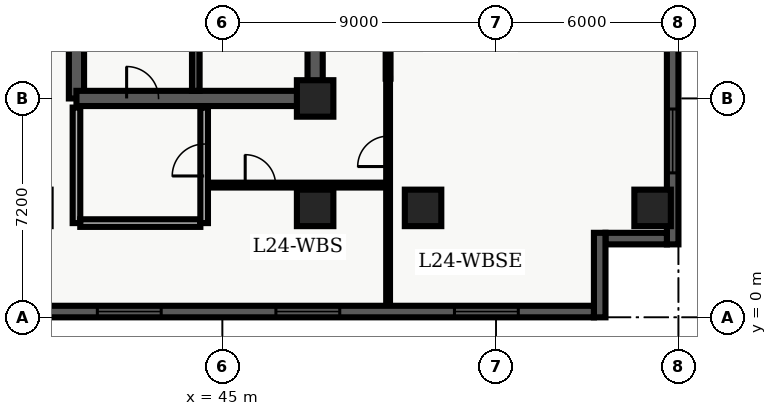
"""IFC4 building model, lengths in metres.
Left out: names, types, materials, properties, quantities, classifications, styles, units other than length and angle.
Written with IfcOpenShell. Run it as: python <this file> out.ifc"""

import sys

from ifc_helpers import new_model, entity, si_unit, converted_unit, direction, frame, origin_with_axes, origin_2d_with_axis, place, context, subcontext, project, spatial, polyline, rectangle, outline, extrude, element, fill, save


model = new_model("IFC4")
c1 = context("Model", 3, precision=1e-05, world=origin_with_axes(), true_north=direction((0.0, 1.0)))
c2 = subcontext(c1, "Body", "Model", "MODEL_VIEW")
j1 = project(units=[si_unit("LENGTHUNIT", "METRE"), converted_unit("PLANEANGLEUNIT", "DEGREE", entity("IfcPlaneAngleMeasure", 0.017), si_unit("PLANEANGLEUNIT", "RADIAN"), dimensions=[0, 0, 0, 0, 0, 0, 0])], contexts=[c1])
p1 = place(None, origin_with_axes())
s1 = spatial("IfcSite", under=j1, at=p1, CompositionType="ELEMENT")
p2 = place(p1, origin_with_axes())
s2 = spatial("IfcBuilding", under=s1, at=p2, CompositionType="ELEMENT")
p3 = place(p2, frame((0.0, 0.0, 100.8), z_axis=(0.0, 0.0, 1.0), x_axis=(1.0, 0.0, 0.0)))
s3 = spatial("IfcBuildingStorey", under=s2, at=p3, CompositionType="ELEMENT", Elevation=100.8)
p4 = place(p3, frame((40.2, 7.2, 0.0), z_axis=(0.0, 0.0, 1.0), x_axis=(0.0, 1.0, 0.0)))
e1 = element("IfcWall", 1, at=p4, inside=s3, PredefinedType="SHEAR", context=c2, shape_type="SweptSolid", body=[
    extrude(outline(polyline([(0.0, -0.25), (15.6, -0.25), (15.6, 0.25), (0.0, 0.25), (0.0, -0.25)])), origin_with_axes(), (0.0, 0.0, 1.0), 3.66),
])
p5 = place(p4, frame((12.75, 0.0, 0.0), z_axis=(0.0, 0.0, 1.0), x_axis=(1.0, 0.0, 0.0)))
e2 = element("IfcOpeningElement", 2, at=p5, cuts=e1, PredefinedType="OPENING", context=c2, shape_type="SweptSolid", body=[
    extrude(rectangle(XDim=1.2, YDim=0.52, at=origin_2d_with_axis()), origin_with_axes(), (0.0, 0.0, 1.0), 2.15),
])
p6 = place(p3, frame((40.2, 7.2, 0.0), z_axis=(0.0, 0.0, 1.0), x_axis=(1.0, 0.0, 0.0)))
e3 = element("IfcWall", 3, at=p6, inside=s3, PredefinedType="SHEAR", context=c2, shape_type="SweptSolid", body=[
    extrude(outline(polyline([(0.0, -0.25), (7.85, -0.25), (7.85, 0.25), (0.0, 0.25), (0.0, -0.25)])), origin_with_axes(), (0.0, 0.0, 1.0), 3.66),
])
p7 = place(p6, frame((2.175, 0.0, 0.0), z_axis=(0.0, 0.0, 1.0), x_axis=(1.0, 0.0, 0.0)))
e4 = element("IfcOpeningElement", 4, at=p7, cuts=e3, PredefinedType="OPENING", context=c2, shape_type="SweptSolid", body=[
    extrude(rectangle(XDim=1.05, YDim=0.52, at=origin_2d_with_axis()), origin_with_axes(), (0.0, 0.0, 1.0), 2.15),
])
p8 = place(p3, frame((48.05, 7.2, 0.0), z_axis=(0.0, 0.0, 1.0), x_axis=(0.0, 1.0, 0.0)))
e5 = element("IfcWall", 5, at=p8, inside=s3, PredefinedType="SHEAR", context=c2, shape_type="SweptSolid", body=[
    extrude(outline(polyline([(0.0, -0.25), (15.6, -0.25), (15.6, 0.25), (0.0, 0.25), (0.0, -0.25)])), origin_with_axes(), (0.0, 0.0, 1.0), 3.66),
])
p9 = place(p8, frame((4.125, 0.0, 0.0), z_axis=(0.0, 0.0, 1.0), x_axis=(1.0, 0.0, 0.0)))
e6 = element("IfcOpeningElement", 6, at=p9, cuts=e5, PredefinedType="OPENING", context=c2, shape_type="SweptSolid", body=[
    extrude(rectangle(XDim=1.05, YDim=0.52, at=origin_2d_with_axis()), origin_with_axes(), (0.0, 0.0, 1.0), 2.15),
])
p10 = place(p3, frame((44.125, 7.45, 0.0), z_axis=(0.0, 0.0, 1.0), x_axis=(0.0, 1.0, 0.0)))
e7 = element("IfcWall", 7, at=p10, inside=s3, PredefinedType="SHEAR", context=c2, shape_type="SweptSolid", body=[
    extrude(outline(polyline([(0.0, -0.125), (15.1, -0.125), (15.1, 0.125), (0.0, 0.125), (0.0, -0.125)])), origin_with_axes(), (0.0, 0.0, 1.0), 3.66),
])
p11 = place(p3, frame((40.2, 3.1, 0.0), z_axis=(0.0, 0.0, 1.0), x_axis=(0.0, 1.0, 0.0)))
e8 = element("IfcWall", 8, at=p11, inside=s3, PredefinedType="SOLIDWALL", context=c2, shape_type="SweptSolid", body=[
    extrude(outline(polyline([(0.0, -0.125), (3.8, -0.125), (3.8, 0.125), (0.0, 0.125), (0.0, -0.125)])), origin_with_axes(), (0.0, 0.0, 1.0), 2.7),
])
p12 = place(p3, frame((40.325, 3.1, 0.0), z_axis=(0.0, 0.0, 1.0), x_axis=(1.0, 0.0, 0.0)))
e9 = element("IfcWall", 9, at=p12, inside=s3, PredefinedType="SOLIDWALL", context=c2, shape_type="SweptSolid", body=[
    extrude(outline(polyline([(0.0, -0.125), (3.95, -0.125), (3.95, 0.125), (0.0, 0.125), (0.0, -0.125)])), origin_with_axes(), (0.0, 0.0, 1.0), 2.7),
])
p13 = place(p3, frame((44.4, 3.1, 0.0), z_axis=(0.0, 0.0, 1.0), x_axis=(0.0, 1.0, 0.0)))
e10 = element("IfcWall", 10, at=p13, inside=s3, PredefinedType="SOLIDWALL", context=c2, shape_type="SweptSolid", body=[
    extrude(outline(polyline([(0.0, -0.125), (3.8, -0.125), (3.8, 0.125), (0.0, 0.125), (0.0, -0.125)])), origin_with_axes(), (0.0, 0.0, 1.0), 2.7),
])
p14 = place(p13, frame((2.075, 0.0, 0.0), z_axis=(0.0, 0.0, 1.0), x_axis=(1.0, 0.0, 0.0)))
e11 = element("IfcOpeningElement", 11, at=p14, cuts=e10, PredefinedType="OPENING", context=c2, shape_type="SweptSolid", body=[
    extrude(rectangle(XDim=1.05, YDim=0.27, at=origin_2d_with_axis()), origin_with_axes(), (0.0, 0.0, 1.0), 2.15),
])
for number, where, z_axis, x_axis in (
    (12, (48.05, 3.6, 0.0), (0.0, 0.0, 1.0), (1.0, 0.0, 0.0)),
    (13, (48.05, 7.2, 0.0), (0.0, 0.0, 1.0), (1.0, 0.0, 0.0)),
    (14, (51.6, 3.6, 0.0), (0.0, 0.0, 1.0), (1.0, 0.0, 0.0)),
    (15, (59.15, 3.6, 0.0), (0.0, 0.0, 1.0), (1.0, 0.0, 0.0)),
):
    element("IfcColumn", number, at=place(p3, frame(where, z_axis=z_axis, x_axis=x_axis)), inside=s3, PredefinedType="COLUMN", context=c2, shape_type="SweptSolid", body=[
        extrude(rectangle(XDim=1.2, YDim=1.2, at=origin_2d_with_axis()), origin_with_axes(), (0.0, 0.0, 1.0), 3.9),
    ])
p15 = place(p3, frame((50.45, 7.85, 0.0), z_axis=(0.0, 0.0, 1.0), x_axis=(0.0, 1.0, 0.0)))
e16 = element("IfcWall", 16, at=p15, inside=s3, PredefinedType="PARTITIONING", context=c2, shape_type="SweptSolid", body=[
    extrude(outline(polyline([(0.0, -0.08), (18.8, -0.08), (18.8, 0.08), (0.0, 0.08), (0.0, -0.08)])), origin_with_axes(), (0.0, 0.0, 1.0), 2.7),
])
p16 = place(p15, frame((6.888, 0.0, 0.0), z_axis=(0.0, 0.0, 1.0), x_axis=(1.0, 0.0, 0.0)))
e17 = element("IfcOpeningElement", 17, at=p16, cuts=e16, PredefinedType="OPENING", context=c2, shape_type="SweptSolid", body=[
    extrude(rectangle(XDim=1.0, YDim=0.18, at=origin_2d_with_axis()), origin_with_axes(), (0.0, 0.0, 1.0), 2.15),
])
p17 = place(p15, frame((12.353, 0.0, 0.0), z_axis=(0.0, 0.0, 1.0), x_axis=(1.0, 0.0, 0.0)))
e18 = element("IfcOpeningElement", 18, at=p17, cuts=e16, PredefinedType="OPENING", context=c2, shape_type="SweptSolid", body=[
    extrude(rectangle(XDim=1.0, YDim=0.18, at=origin_2d_with_axis()), origin_with_axes(), (0.0, 0.0, 1.0), 2.15),
])
p18 = place(p15, frame((17.895, 0.0, 0.0), z_axis=(0.0, 0.0, 1.0), x_axis=(1.0, 0.0, 0.0)))
e19 = element("IfcOpeningElement", 19, at=p18, cuts=e16, PredefinedType="OPENING", context=c2, shape_type="SweptSolid", body=[
    extrude(rectangle(XDim=1.0, YDim=0.18, at=origin_2d_with_axis()), origin_with_axes(), (0.0, 0.0, 1.0), 2.15),
])
p19 = place(p3, frame((44.55, 4.35, 0.0), z_axis=(0.0, 0.0, 1.0), x_axis=(1.0, 0.0, 0.0)))
e20 = element("IfcWall", 20, at=p19, inside=s3, PredefinedType="PARTITIONING", context=c2, shape_type="SweptSolid", body=[
    extrude(outline(polyline([(0.0, -0.08), (5.9, -0.08), (5.9, 0.08), (0.0, 0.08), (0.0, -0.08)])), origin_with_axes(), (0.0, 0.0, 1.0), 2.7),
])
p20 = place(p19, frame((1.7, 0.0, 0.0), z_axis=(0.0, 0.0, 1.0), x_axis=(1.0, 0.0, 0.0)))
e21 = element("IfcOpeningElement", 21, at=p20, cuts=e20, PredefinedType="OPENING", context=c2, shape_type="SweptSolid", body=[
    extrude(rectangle(XDim=1.0, YDim=0.18, at=origin_2d_with_axis()), origin_with_axes(), (0.0, 0.0, 1.0), 2.15),
])
p21 = place(p3, frame((50.45, 0.36, 0.0), z_axis=(0.0, 0.0, 1.0), x_axis=(0.0, 1.0, 0.0)))
e22 = element("IfcWall", 22, at=p21, inside=s3, PredefinedType="PARTITIONING", context=c2, shape_type="SweptSolid", body=[
    extrude(outline(polyline([(0.0, -0.062), (7.49, -0.062), (7.49, 0.062), (0.0, 0.062), (0.0, -0.062)])), origin_with_axes(), (0.0, 0.0, 1.0), 2.7),
])
p22 = place(p21, frame((5.1, 0.0, 0.0), z_axis=(0.0, 0.0, 1.0), x_axis=(1.0, 0.0, 0.0)))
e23 = element("IfcOpeningElement", 23, at=p22, cuts=e22, PredefinedType="OPENING", context=c2, shape_type="SweptSolid", body=[
    extrude(rectangle(XDim=1.0, YDim=0.145, at=origin_2d_with_axis()), origin_with_axes(), (0.0, 0.0, 1.0), 2.15),
])
p23 = place(p3, frame((59.81, 26.02, 0.0), z_axis=(0.0, 0.0, 1.0), x_axis=(0.0, -1.0, 0.0)))
e24 = element("IfcWall", 24, at=p23, inside=s3, PredefinedType="SOLIDWALL", context=c2, shape_type="SweptSolid", body=[
    extrude(outline(polyline([(0.0, -0.19), (23.62, -0.19), (23.62, 0.19), (0.0, 0.19), (0.0, -0.19)])), origin_with_axes(), (0.0, 0.0, 1.0), 3.66),
])
p24 = place(p23, frame((20.218, 0.0, 0.45), z_axis=(0.0, 0.0, 1.0), x_axis=(1.0, 0.0, 0.0)))
e25 = element("IfcOpeningElement", 25, at=p24, cuts=e24, PredefinedType="OPENING", context=c2, shape_type="SweptSolid", body=[
    extrude(rectangle(XDim=2.1, YDim=0.4, at=origin_2d_with_axis()), origin_with_axes(), (0.0, 0.0, 1.0), 2.2),
])
p25 = place(p3, frame((59.62, 2.59, 0.0), z_axis=(0.0, 0.0, 1.0), x_axis=(-1.0, 0.0, 0.0)))
e26 = element("IfcWall", 26, at=p25, inside=s3, PredefinedType="SOLIDWALL", context=c2, shape_type="SweptSolid", body=[
    extrude(outline(polyline([(0.0, -0.19), (2.02, -0.19), (2.02, 0.19), (0.0, 0.19), (0.0, -0.19)])), origin_with_axes(), (0.0, 0.0, 1.0), 3.66),
])
p26 = place(p3, frame((57.41, 2.78, 0.0), z_axis=(0.0, 0.0, 1.0), x_axis=(0.0, -1.0, 0.0)))
e27 = element("IfcWall", 27, at=p26, inside=s3, PredefinedType="SOLIDWALL", context=c2, shape_type="SweptSolid", body=[
    extrude(outline(polyline([(0.0, -0.19), (2.78, -0.19), (2.78, 0.19), (0.0, 0.19), (0.0, -0.19)])), origin_with_axes(), (0.0, 0.0, 1.0), 3.66),
])
p27 = place(p3, frame((57.22, 0.19, 0.0), z_axis=(0.0, 0.0, 1.0), x_axis=(-1.0, 0.0, 0.0)))
e28 = element("IfcWall", 28, at=p27, inside=s3, PredefinedType="SOLIDWALL", context=c2, shape_type="SweptSolid", body=[
    extrude(outline(polyline([(0.0, -0.19), (18.82, -0.19), (18.82, 0.19), (0.0, 0.19), (0.0, -0.19)])), origin_with_axes(), (0.0, 0.0, 1.0), 3.66),
])
p28 = place(p27, frame((3.537, 0.0, 0.45), z_axis=(0.0, 0.0, 1.0), x_axis=(1.0, 0.0, 0.0)))
e29 = element("IfcOpeningElement", 29, at=p28, cuts=e28, PredefinedType="OPENING", context=c2, shape_type="SweptSolid", body=[
    extrude(rectangle(XDim=2.1, YDim=0.4, at=origin_2d_with_axis()), origin_with_axes(), (0.0, 0.0, 1.0), 2.2),
])
p29 = place(p27, frame((9.41, 0.0, 0.45), z_axis=(0.0, 0.0, 1.0), x_axis=(1.0, 0.0, 0.0)))
e30 = element("IfcOpeningElement", 30, at=p29, cuts=e28, PredefinedType="OPENING", context=c2, shape_type="SweptSolid", body=[
    extrude(rectangle(XDim=2.1, YDim=0.4, at=origin_2d_with_axis()), origin_with_axes(), (0.0, 0.0, 1.0), 2.2),
])
p30 = place(p27, frame((15.283, 0.0, 0.45), z_axis=(0.0, 0.0, 1.0), x_axis=(1.0, 0.0, 0.0)))
e31 = element("IfcOpeningElement", 31, at=p30, cuts=e28, PredefinedType="OPENING", context=c2, shape_type="SweptSolid", body=[
    extrude(rectangle(XDim=2.1, YDim=0.4, at=origin_2d_with_axis()), origin_with_axes(), (0.0, 0.0, 1.0), 2.2),
])
p31 = place(p6, frame((2.175, 0.0, 0.0), z_axis=(0.0, 0.0, 1.0), x_axis=(1.0, 0.0, 0.0)))
e32 = element("IfcDoor", 32, at=p31, inside=s3, OperationType="SINGLE_SWING_LEFT", PredefinedType="DOOR", context=c2, shape_type="SweptSolid", body=[
    extrude(rectangle(XDim=1.05, YDim=0.09, at=origin_2d_with_axis()), origin_with_axes(), (0.0, 0.0, 1.0), 2.15),
])
fill(e4, e32)
p32 = place(p13, frame((2.075, 0.0, 0.0), z_axis=(0.0, 0.0, 1.0), x_axis=(1.0, 0.0, 0.0)))
e33 = element("IfcDoor", 33, at=p32, inside=s3, OperationType="SINGLE_SWING_LEFT", PredefinedType="DOOR", context=c2, shape_type="SweptSolid", body=[
    extrude(rectangle(XDim=1.05, YDim=0.09, at=origin_2d_with_axis()), origin_with_axes(), (0.0, 0.0, 1.0), 2.15),
])
fill(e11, e33)
p33 = place(p19, frame((1.7, 0.0, 0.0), z_axis=(0.0, 0.0, 1.0), x_axis=(1.0, 0.0, 0.0)))
e34 = element("IfcDoor", 34, at=p33, inside=s3, OperationType="SINGLE_SWING_LEFT", PredefinedType="DOOR", context=c2, shape_type="SweptSolid", body=[
    extrude(rectangle(XDim=1.0, YDim=0.09, at=origin_2d_with_axis()), origin_with_axes(), (0.0, 0.0, 1.0), 2.15),
])
fill(e21, e34)
p34 = place(p21, frame((5.1, 0.0, 0.0), z_axis=(0.0, 0.0, 1.0), x_axis=(1.0, 0.0, 0.0)))
e35 = element("IfcDoor", 35, at=p34, inside=s3, OperationType="SINGLE_SWING_LEFT", PredefinedType="DOOR", context=c2, shape_type="SweptSolid", body=[
    extrude(rectangle(XDim=1.0, YDim=0.075, at=origin_2d_with_axis()), origin_with_axes(), (0.0, 0.0, 1.0), 2.15),
])
fill(e23, e35)
p35 = place(p23, frame((20.218, 0.0, 0.45), z_axis=(0.0, 0.0, 1.0), x_axis=(1.0, 0.0, 0.0)))
e36 = element("IfcWindow", 36, at=p35, inside=s3, PredefinedType="WINDOW", context=c2, shape_type="SweptSolid", body=[
    extrude(rectangle(XDim=2.1, YDim=0.09, at=origin_2d_with_axis()), origin_with_axes(), (0.0, 0.0, 1.0), 2.2),
])
fill(e25, e36)
p36 = place(p27, frame((3.537, 0.0, 0.45), z_axis=(0.0, 0.0, 1.0), x_axis=(1.0, 0.0, 0.0)))
e37 = element("IfcWindow", 37, at=p36, inside=s3, PredefinedType="WINDOW", context=c2, shape_type="SweptSolid", body=[
    extrude(rectangle(XDim=2.1, YDim=0.09, at=origin_2d_with_axis()), origin_with_axes(), (0.0, 0.0, 1.0), 2.2),
])
fill(e29, e37)
p37 = place(p27, frame((9.41, 0.0, 0.45), z_axis=(0.0, 0.0, 1.0), x_axis=(1.0, 0.0, 0.0)))
e38 = element("IfcWindow", 38, at=p37, inside=s3, PredefinedType="WINDOW", context=c2, shape_type="SweptSolid", body=[
    extrude(rectangle(XDim=2.1, YDim=0.09, at=origin_2d_with_axis()), origin_with_axes(), (0.0, 0.0, 1.0), 2.2),
])
fill(e30, e38)
p38 = place(p27, frame((15.283, 0.0, 0.45), z_axis=(0.0, 0.0, 1.0), x_axis=(1.0, 0.0, 0.0)))
e39 = element("IfcWindow", 39, at=p38, inside=s3, PredefinedType="WINDOW", context=c2, shape_type="SweptSolid", body=[
    extrude(rectangle(XDim=2.1, YDim=0.09, at=origin_2d_with_axis()), origin_with_axes(), (0.0, 0.0, 1.0), 2.2),
])
fill(e31, e39)
save(model, sys.argv[1])
